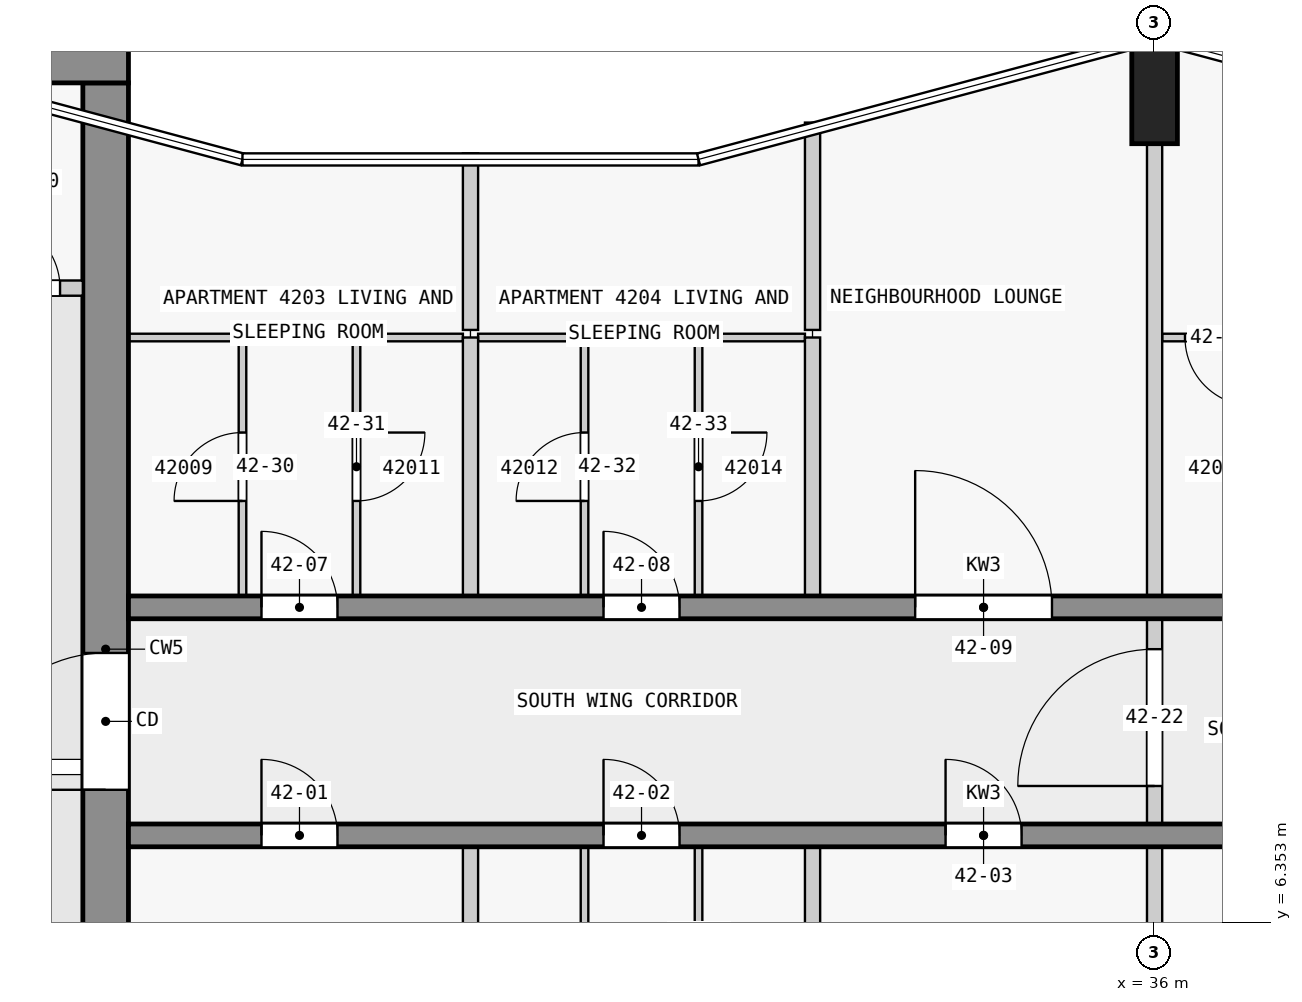
"""IFC4 building model, lengths in metres.
Left out: names, types, materials, properties, quantities, classifications, styles, units other than length and angle.
Written with IfcOpenShell. Run it as: python <this file> out.ifc"""

import sys

from ifc_helpers import new_model, si_unit, direction, frame, frame_2d, origin, origin_2d, place, context, subcontext, project, spatial, rectangle, extrude, element, fill, save


model = new_model("IFC4")
c1 = context("Model", 3, precision=1e-05, world=origin(), true_north=direction((0.0, 1.0)))
c2 = subcontext(c1, "Body", "Model", "MODEL_VIEW")
j1 = project(units=[si_unit("LENGTHUNIT", "METRE"), si_unit("PLANEANGLEUNIT", "RADIAN")], contexts=[c1])
p1 = place(None, origin())
s1 = spatial("IfcSite", under=j1, at=p1, CompositionType="ELEMENT")
p2 = place(p1, origin())
s2 = spatial("IfcBuilding", under=s1, at=p2, CompositionType="ELEMENT")
p3 = place(p2, frame((0.0, 0.0, 163.9)))
s3 = spatial("IfcBuildingStorey", under=s2, at=p3, CompositionType="ELEMENT", Elevation=163.9)
p4 = place(p3, frame((36.0, 17.3, 0.0), z_axis=(0.0, 0.0, 1.0), x_axis=(1.0, 0.0, 0.0)))
e1 = element("IfcColumn", 1, at=p4, inside=s3, PredefinedType="COLUMN", context=c2, shape_type="SweptSolid", body=[
    extrude(rectangle(XDim=0.6, YDim=1.4, at=origin_2d()), origin(), (0.0, 0.0, 1.0), 3.5),
])
p5 = place(p3, frame((1.38, 17.7, 0.0), z_axis=(0.0, 0.0, 1.0), x_axis=(1.0, 0.0, 0.0)))
e2 = element("IfcWall", 2, at=p5, inside=s3, PredefinedType="SHEAR", context=c2, shape_type="SweptSolid", body=[
    extrude(rectangle(XDim=21.12, YDim=0.6, at=frame_2d((10.56, 0.0))), origin(), (0.0, 0.0, 1.0), 3.25),
])
p6 = place(p5, frame((6.4, 0.0, 0.0)))
e3 = element("IfcOpeningElement", 3, at=p6, cuts=e2, PredefinedType="OPENING", context=c2, shape_type="SweptSolid", body=[
    extrude(rectangle(XDim=1.8, YDim=2.1, at=frame_2d((0.9, 1.05))), frame((0.0, 0.31, 0.0), z_axis=(0.0, -1.0, 0.0), x_axis=(1.0, 0.0, 0.0)), (0.0, 0.0, 1.0), 0.62),
])
p7 = place(p3, frame((22.2, 2.5, 0.0), z_axis=(0.0, 0.0, 1.0), x_axis=(0.0, 1.0, 0.0)))
e4 = element("IfcWall", 4, at=p7, inside=s3, PredefinedType="SHEAR", context=c2, shape_type="SweptSolid", body=[
    extrude(rectangle(XDim=14.9, YDim=0.6, at=frame_2d((7.45, 0.0))), origin(), (0.0, 0.0, 1.0), 3.25),
])
p8 = place(p7, frame((5.6, 0.0, 0.0)))
e5 = element("IfcOpeningElement", 5, at=p8, cuts=e4, PredefinedType="OPENING", context=c2, shape_type="SweptSolid", body=[
    extrude(rectangle(XDim=1.8, YDim=2.1, at=frame_2d((0.9, 1.05))), frame((0.0, 0.31, 0.0), z_axis=(0.0, -1.0, 0.0), x_axis=(1.0, 0.0, 0.0)), (0.0, 0.0, 1.0), 0.62),
])
p9 = place(p3, frame((22.5, 7.5, 0.0), z_axis=(0.0, 0.0, 1.0), x_axis=(1.0, 0.0, 0.0)))
e6 = element("IfcWall", 6, at=p9, inside=s3, PredefinedType="SHEAR", context=c2, shape_type="SweptSolid", body=[
    extrude(rectangle(XDim=22.5, YDim=0.3, at=frame_2d((11.25, 0.0))), origin(), (0.0, 0.0, 1.0), 3.25),
])
p10 = place(p9, frame((1.75, 0.0, 0.0)))
e7 = element("IfcOpeningElement", 7, at=p10, cuts=e6, PredefinedType="OPENING", context=c2, shape_type="SweptSolid", body=[
    extrude(rectangle(XDim=1.0, YDim=2.1, at=frame_2d((0.5, 1.05))), frame((0.0, 0.16, 0.0), z_axis=(0.0, -1.0, 0.0), x_axis=(1.0, 0.0, 0.0)), (0.0, 0.0, 1.0), 0.32),
])
p11 = place(p9, frame((6.25, 0.0, 0.0)))
e8 = element("IfcOpeningElement", 8, at=p11, cuts=e6, PredefinedType="OPENING", context=c2, shape_type="SweptSolid", body=[
    extrude(rectangle(XDim=1.0, YDim=2.1, at=frame_2d((0.5, 1.05))), frame((0.0, 0.16, 0.0), z_axis=(0.0, -1.0, 0.0), x_axis=(1.0, 0.0, 0.0)), (0.0, 0.0, 1.0), 0.32),
])
p12 = place(p9, frame((10.75, 0.0, 0.0)))
e9 = element("IfcOpeningElement", 9, at=p12, cuts=e6, PredefinedType="OPENING", context=c2, shape_type="SweptSolid", body=[
    extrude(rectangle(XDim=1.0, YDim=2.1, at=frame_2d((0.5, 1.05))), frame((0.0, 0.16, 0.0), z_axis=(0.0, -1.0, 0.0), x_axis=(1.0, 0.0, 0.0)), (0.0, 0.0, 1.0), 0.32),
])
p13 = place(p9, frame((15.25, 0.0, 0.0)))
e10 = element("IfcOpeningElement", 10, at=p13, cuts=e6, PredefinedType="OPENING", context=c2, shape_type="SweptSolid", body=[
    extrude(rectangle(XDim=1.0, YDim=2.1, at=frame_2d((0.5, 1.05))), frame((0.0, 0.16, 0.0), z_axis=(0.0, -1.0, 0.0), x_axis=(1.0, 0.0, 0.0)), (0.0, 0.0, 1.0), 0.32),
])
p14 = place(p9, frame((18.75, 0.0, 0.0)))
e11 = element("IfcOpeningElement", 11, at=p14, cuts=e6, PredefinedType="OPENING", context=c2, shape_type="SweptSolid", body=[
    extrude(rectangle(XDim=0.9, YDim=2.1, at=frame_2d((0.45, 1.05))), frame((0.0, 0.16, 0.0), z_axis=(0.0, -1.0, 0.0), x_axis=(1.0, 0.0, 0.0)), (0.0, 0.0, 1.0), 0.32),
])
p15 = place(p9, frame((20.95, 0.0, 0.0)))
e12 = element("IfcOpeningElement", 12, at=p15, cuts=e6, PredefinedType="OPENING", context=c2, shape_type="SweptSolid", body=[
    extrude(rectangle(XDim=1.0, YDim=2.1, at=frame_2d((0.5, 1.05))), frame((0.0, 0.16, 0.0), z_axis=(0.0, -1.0, 0.0), x_axis=(1.0, 0.0, 0.0)), (0.0, 0.0, 1.0), 0.32),
])
p16 = place(p3, frame((22.5, 10.5, 0.0), z_axis=(0.0, 0.0, 1.0), x_axis=(1.0, 0.0, 0.0)))
e13 = element("IfcWall", 13, at=p16, inside=s3, PredefinedType="SHEAR", context=c2, shape_type="SweptSolid", body=[
    extrude(rectangle(XDim=22.5, YDim=0.3, at=frame_2d((11.25, 0.0))), origin(), (0.0, 0.0, 1.0), 3.25),
])
p17 = place(p16, frame((1.75, 0.0, 0.0)))
e14 = element("IfcOpeningElement", 14, at=p17, cuts=e13, PredefinedType="OPENING", context=c2, shape_type="SweptSolid", body=[
    extrude(rectangle(XDim=1.0, YDim=2.1, at=frame_2d((0.5, 1.05))), frame((0.0, 0.16, 0.0), z_axis=(0.0, -1.0, 0.0), x_axis=(1.0, 0.0, 0.0)), (0.0, 0.0, 1.0), 0.32),
])
p18 = place(p16, frame((6.25, 0.0, 0.0)))
e15 = element("IfcOpeningElement", 15, at=p18, cuts=e13, PredefinedType="OPENING", context=c2, shape_type="SweptSolid", body=[
    extrude(rectangle(XDim=1.0, YDim=2.1, at=frame_2d((0.5, 1.05))), frame((0.0, 0.16, 0.0), z_axis=(0.0, -1.0, 0.0), x_axis=(1.0, 0.0, 0.0)), (0.0, 0.0, 1.0), 0.32),
])
p19 = place(p16, frame((10.35, 0.0, 0.0)))
e16 = element("IfcOpeningElement", 16, at=p19, cuts=e13, PredefinedType="OPENING", context=c2, shape_type="SweptSolid", body=[
    extrude(rectangle(XDim=1.8, YDim=2.1, at=frame_2d((0.9, 1.05))), frame((0.0, 0.16, 0.0), z_axis=(0.0, -1.0, 0.0), x_axis=(1.0, 0.0, 0.0)), (0.0, 0.0, 1.0), 0.32),
])
p20 = place(p16, frame((16.85, 0.0, 0.0)))
e17 = element("IfcOpeningElement", 17, at=p20, cuts=e13, PredefinedType="OPENING", context=c2, shape_type="SweptSolid", body=[
    extrude(rectangle(XDim=1.0, YDim=2.1, at=frame_2d((0.5, 1.05))), frame((0.0, 0.16, 0.0), z_axis=(0.0, -1.0, 0.0), x_axis=(1.0, 0.0, 0.0)), (0.0, 0.0, 1.0), 0.32),
])
p21 = place(p3, frame((18.6, 14.7, 0.0), z_axis=(0.0, 0.0, 1.0), x_axis=(1.0, 0.0, 0.0)))
e18 = element("IfcWall", 18, at=p21, inside=s3, PredefinedType="PARTITIONING", context=c2, shape_type="SweptSolid", body=[
    extrude(rectangle(XDim=3.3, YDim=0.2, at=frame_2d((1.65, 0.0))), origin(), (0.0, 0.0, 1.0), 3.25),
])
p22 = place(p21, frame((0.45, 0.0, 0.0)))
e19 = element("IfcOpeningElement", 19, at=p22, cuts=e18, PredefinedType="OPENING", context=c2, shape_type="SweptSolid", body=[
    extrude(rectangle(XDim=0.9, YDim=2.1, at=frame_2d((0.45, 1.05))), frame((0.0, 0.11, 0.0), z_axis=(0.0, -1.0, 0.0), x_axis=(1.0, 0.0, 0.0)), (0.0, 0.0, 1.0), 0.22),
])
p23 = place(p21, frame((2.1, 0.0, 0.0)))
e20 = element("IfcOpeningElement", 20, at=p23, cuts=e18, PredefinedType="OPENING", context=c2, shape_type="SweptSolid", body=[
    extrude(rectangle(XDim=0.9, YDim=2.1, at=frame_2d((0.45, 1.05))), frame((0.0, 0.11, 0.0), z_axis=(0.0, -1.0, 0.0), x_axis=(1.0, 0.0, 0.0)), (0.0, 0.0, 1.0), 0.22),
])
p24 = place(p3, frame((23.95, 14.05, 0.0), z_axis=(0.0, 0.0, 1.0), x_axis=(-1.0, 0.0, 0.0)))
e21 = element("IfcWall", 21, at=p24, inside=s3, PredefinedType="PARTITIONING", context=c2, shape_type="SweptSolid", body=[
    extrude(rectangle(XDim=1.45, YDim=0.1, at=frame_2d((0.725, 0.0))), origin(), (0.0, 0.0, 1.0), 3.25),
])
for number, where, z_axis, x_axis in (
    (22, (26.9, 14.05, 0.0), (0.0, 0.0, 1.0), (-1.0, 0.0, 0.0)),
    (23, (28.45, 14.05, 0.0), (0.0, 0.0, 1.0), (-1.0, 0.0, 0.0)),
    (24, (31.4, 14.05, 0.0), (0.0, 0.0, 1.0), (-1.0, 0.0, 0.0)),
):
    element("IfcWall", number, at=place(p3, frame(where, z_axis=z_axis, x_axis=x_axis)), inside=s3, PredefinedType="PARTITIONING", context=c2, shape_type="SweptSolid", body=[
        extrude(rectangle(XDim=1.35, YDim=0.1, at=frame_2d((0.675, 0.0))), origin(), (0.0, 0.0, 1.0), 3.25),
    ])
p25 = place(p3, frame((37.55, 14.05, 0.0), z_axis=(0.0, 0.0, 1.0), x_axis=(-1.0, 0.0, 0.0)))
e25 = element("IfcWall", 25, at=p25, inside=s3, PredefinedType="PARTITIONING", context=c2, shape_type="SweptSolid", body=[
    extrude(rectangle(XDim=1.45, YDim=0.1, at=frame_2d((0.725, 0.0))), origin(), (0.0, 0.0, 1.0), 3.25),
])
p26 = place(p25, frame((0.25, 0.0, 0.0)))
e26 = element("IfcOpeningElement", 26, at=p26, cuts=e25, PredefinedType="OPENING", context=c2, shape_type="SweptSolid", body=[
    extrude(rectangle(XDim=0.9, YDim=2.1, at=frame_2d((0.45, 1.05))), frame((0.0, 0.06, 0.0), z_axis=(0.0, -1.0, 0.0), x_axis=(1.0, 0.0, 0.0)), (0.0, 0.0, 1.0), 0.12),
])
p27 = place(p3, frame((24.0, 10.65, 0.0), z_axis=(0.0, 0.0, 1.0), x_axis=(0.0, 1.0, 0.0)))
e27 = element("IfcWall", 27, at=p27, inside=s3, PredefinedType="PARTITIONING", context=c2, shape_type="SweptSolid", body=[
    extrude(rectangle(XDim=3.4, YDim=0.1, at=frame_2d((1.7, 0.0))), origin(), (0.0, 0.0, 1.0), 3.25),
])
p28 = place(p27, frame((1.25, 0.0, 0.0)))
e28 = element("IfcOpeningElement", 28, at=p28, cuts=e27, PredefinedType="OPENING", context=c2, shape_type="SweptSolid", body=[
    extrude(rectangle(XDim=0.9, YDim=2.1, at=frame_2d((0.45, 1.05))), frame((0.0, 0.06, 0.0), z_axis=(0.0, -1.0, 0.0), x_axis=(1.0, 0.0, 0.0)), (0.0, 0.0, 1.0), 0.12),
])
p29 = place(p3, frame((25.5, 14.05, 0.0), z_axis=(0.0, 0.0, 1.0), x_axis=(0.0, -1.0, 0.0)))
e29 = element("IfcWall", 29, at=p29, inside=s3, PredefinedType="PARTITIONING", context=c2, shape_type="SweptSolid", body=[
    extrude(rectangle(XDim=3.4, YDim=0.1, at=frame_2d((1.7, 0.0))), origin(), (0.0, 0.0, 1.0), 3.25),
])
p30 = place(p29, frame((1.25, 0.0, 0.0)))
e30 = element("IfcOpeningElement", 30, at=p30, cuts=e29, PredefinedType="OPENING", context=c2, shape_type="SweptSolid", body=[
    extrude(rectangle(XDim=0.9, YDim=2.1, at=frame_2d((0.45, 1.05))), frame((0.0, 0.06, 0.0), z_axis=(0.0, -1.0, 0.0), x_axis=(1.0, 0.0, 0.0)), (0.0, 0.0, 1.0), 0.12),
])
p31 = place(p3, frame((27.0, 16.473, 0.0), z_axis=(0.0, 0.0, 1.0), x_axis=(0.0, -1.0, 0.0)))
e31 = element("IfcWall", 31, at=p31, inside=s3, PredefinedType="PARTITIONING", context=c2, shape_type="SweptSolid", body=[
    extrude(rectangle(XDim=2.323, YDim=0.2, at=frame_2d((1.162, 0.0))), origin(), (0.0, 0.0, 1.0), 3.25),
])
p32 = place(p3, frame((27.0, 1.527, 0.0), z_axis=(0.0, 0.0, 1.0), x_axis=(0.0, 1.0, 0.0)))
e32 = element("IfcWall", 32, at=p32, inside=s3, PredefinedType="PARTITIONING", context=c2, shape_type="SweptSolid", body=[
    extrude(rectangle(XDim=5.823, YDim=0.2, at=frame_2d((2.912, 0.0))), origin(), (0.0, 0.0, 1.0), 3.25),
])
p33 = place(p3, frame((27.0, 10.65, 0.0), z_axis=(0.0, 0.0, 1.0), x_axis=(0.0, 1.0, 0.0)))
e33 = element("IfcWall", 33, at=p33, inside=s3, PredefinedType="PARTITIONING", context=c2, shape_type="SweptSolid", body=[
    extrude(rectangle(XDim=3.4, YDim=0.2, at=frame_2d((1.7, 0.0))), origin(), (0.0, 0.0, 1.0), 3.25),
])
p34 = place(p3, frame((28.5, 3.95, 0.0), z_axis=(0.0, 0.0, 1.0), x_axis=(0.0, 1.0, 0.0)))
e34 = element("IfcWall", 34, at=p34, inside=s3, PredefinedType="PARTITIONING", context=c2, shape_type="SweptSolid", body=[
    extrude(rectangle(XDim=3.4, YDim=0.1, at=frame_2d((1.7, 0.0))), origin(), (0.0, 0.0, 1.0), 3.25),
])
p35 = place(p34, frame((1.25, 0.0, 0.0)))
e35 = element("IfcOpeningElement", 35, at=p35, cuts=e34, PredefinedType="OPENING", context=c2, shape_type="SweptSolid", body=[
    extrude(rectangle(XDim=0.9, YDim=2.1, at=frame_2d((0.45, 1.05))), frame((0.0, 0.06, 0.0), z_axis=(0.0, -1.0, 0.0), x_axis=(1.0, 0.0, 0.0)), (0.0, 0.0, 1.0), 0.12),
])
p36 = place(p3, frame((28.5, 10.65, 0.0), z_axis=(0.0, 0.0, 1.0), x_axis=(0.0, 1.0, 0.0)))
e36 = element("IfcWall", 36, at=p36, inside=s3, PredefinedType="PARTITIONING", context=c2, shape_type="SweptSolid", body=[
    extrude(rectangle(XDim=3.4, YDim=0.1, at=frame_2d((1.7, 0.0))), origin(), (0.0, 0.0, 1.0), 3.25),
])
p37 = place(p36, frame((1.25, 0.0, 0.0)))
e37 = element("IfcOpeningElement", 37, at=p37, cuts=e36, PredefinedType="OPENING", context=c2, shape_type="SweptSolid", body=[
    extrude(rectangle(XDim=0.9, YDim=2.1, at=frame_2d((0.45, 1.05))), frame((0.0, 0.06, 0.0), z_axis=(0.0, -1.0, 0.0), x_axis=(1.0, 0.0, 0.0)), (0.0, 0.0, 1.0), 0.12),
])
p38 = place(p3, frame((30.0, 7.35, 0.0), z_axis=(0.0, 0.0, 1.0), x_axis=(0.0, -1.0, 0.0)))
e38 = element("IfcWall", 38, at=p38, inside=s3, PredefinedType="PARTITIONING", context=c2, shape_type="SweptSolid", body=[
    extrude(rectangle(XDim=3.4, YDim=0.1, at=frame_2d((1.7, 0.0))), origin(), (0.0, 0.0, 1.0), 3.25),
])
p39 = place(p38, frame((1.25, 0.0, 0.0)))
e39 = element("IfcOpeningElement", 39, at=p39, cuts=e38, PredefinedType="OPENING", context=c2, shape_type="SweptSolid", body=[
    extrude(rectangle(XDim=0.9, YDim=2.1, at=frame_2d((0.45, 1.05))), frame((0.0, 0.06, 0.0), z_axis=(0.0, -1.0, 0.0), x_axis=(1.0, 0.0, 0.0)), (0.0, 0.0, 1.0), 0.12),
])
p40 = place(p3, frame((30.0, 14.05, 0.0), z_axis=(0.0, 0.0, 1.0), x_axis=(0.0, -1.0, 0.0)))
e40 = element("IfcWall", 40, at=p40, inside=s3, PredefinedType="PARTITIONING", context=c2, shape_type="SweptSolid", body=[
    extrude(rectangle(XDim=3.4, YDim=0.1, at=frame_2d((1.7, 0.0))), origin(), (0.0, 0.0, 1.0), 3.25),
])
p41 = place(p40, frame((1.25, 0.0, 0.0)))
e41 = element("IfcOpeningElement", 41, at=p41, cuts=e40, PredefinedType="OPENING", context=c2, shape_type="SweptSolid", body=[
    extrude(rectangle(XDim=0.9, YDim=2.1, at=frame_2d((0.45, 1.05))), frame((0.0, 0.06, 0.0), z_axis=(0.0, -1.0, 0.0), x_axis=(1.0, 0.0, 0.0)), (0.0, 0.0, 1.0), 0.12),
])
p42 = place(p3, frame((31.5, 16.878, 0.0), z_axis=(0.0, 0.0, 1.0), x_axis=(0.0, -1.0, 0.0)))
e42 = element("IfcWall", 42, at=p42, inside=s3, PredefinedType="PARTITIONING", context=c2, shape_type="SweptSolid", body=[
    extrude(rectangle(XDim=2.728, YDim=0.2, at=frame_2d((1.364, 0.0))), origin(), (0.0, 0.0, 1.0), 3.25),
])
for number, where, z_axis, x_axis in (
    (43, (31.5, 3.95, 0.0), (0.0, 0.0, 1.0), (0.0, 1.0, 0.0)),
    (44, (31.5, 10.65, 0.0), (0.0, 0.0, 1.0), (0.0, 1.0, 0.0)),
):
    element("IfcWall", number, at=place(p3, frame(where, z_axis=z_axis, x_axis=x_axis)), inside=s3, PredefinedType="PARTITIONING", context=c2, shape_type="SweptSolid", body=[
        extrude(rectangle(XDim=3.4, YDim=0.2, at=frame_2d((1.7, 0.0))), origin(), (0.0, 0.0, 1.0), 3.25),
    ])
for number, where, z_axis, x_axis in (
    (45, (36.0, 1.4, 0.0), (0.0, 0.0, 1.0), (0.0, 1.0, 0.0)),
    (46, (36.0, 10.65, 0.0), (0.0, 0.0, 1.0), (0.0, 1.0, 0.0)),
):
    element("IfcWall", number, at=place(p3, frame(where, z_axis=z_axis, x_axis=x_axis)), inside=s3, PredefinedType="PARTITIONING", context=c2, shape_type="SweptSolid", body=[
        extrude(rectangle(XDim=5.95, YDim=0.2, at=frame_2d((2.975, 0.0))), origin(), (0.0, 0.0, 1.0), 3.25),
    ])
p43 = place(p3, frame((36.0, 7.45, 0.0), z_axis=(0.0, 0.0, 1.0), x_axis=(0.0, 1.0, 0.0)))
e47 = element("IfcWall", 47, at=p43, inside=s3, PredefinedType="PARTITIONING", context=c2, shape_type="SweptSolid", body=[
    extrude(rectangle(XDim=3.1, YDim=0.2, at=frame_2d((1.55, 0.0))), origin(), (0.0, 0.0, 1.0), 3.25),
])
p44 = place(p43, frame((0.7, 0.0, 0.0)))
e48 = element("IfcOpeningElement", 48, at=p44, cuts=e47, PredefinedType="OPENING", context=c2, shape_type="SweptSolid", body=[
    extrude(rectangle(XDim=1.8, YDim=2.1, at=frame_2d((0.9, 1.05))), frame((0.0, 0.11, 0.0), z_axis=(0.0, -1.0, 0.0), x_axis=(1.0, 0.0, 0.0)), (0.0, 0.0, 1.0), 0.22),
])
p45 = place(p8, origin())
e49 = element("IfcDoor", 49, at=p45, inside=s3, OperationType="DOUBLE_DOOR_SINGLE_SWING", PredefinedType="DOOR", context=c2, shape_type="SweptSolid", body=[
    extrude(rectangle(XDim=1.8, YDim=2.1, at=frame_2d((0.9, 1.05))), frame((0.0, 0.025, 0.0), z_axis=(0.0, -1.0, 0.0), x_axis=(1.0, 0.0, 0.0)), (0.0, 0.0, 1.0), 0.05),
])
fill(e5, e49)
p46 = place(p23, origin())
e50 = element("IfcDoor", 50, at=p46, inside=s3, OperationType="SINGLE_SWING_LEFT", PredefinedType="DOOR", context=c2, shape_type="SweptSolid", body=[
    extrude(rectangle(XDim=0.9, YDim=2.1, at=frame_2d((0.45, 1.05))), frame((0.0, 0.025, 0.0), z_axis=(0.0, -1.0, 0.0), x_axis=(1.0, 0.0, 0.0)), (0.0, 0.0, 1.0), 0.05),
])
fill(e20, e50)
p47 = place(p10, origin())
e51 = element("IfcDoor", 51, at=p47, inside=s3, OperationType="SINGLE_SWING_LEFT", PredefinedType="DOOR", context=c2, shape_type="SweptSolid", body=[
    extrude(rectangle(XDim=1.0, YDim=2.1, at=frame_2d((0.5, 1.05))), frame((0.0, 0.025, 0.0), z_axis=(0.0, -1.0, 0.0), x_axis=(1.0, 0.0, 0.0)), (0.0, 0.0, 1.0), 0.05),
])
fill(e7, e51)
p48 = place(p11, origin())
e52 = element("IfcDoor", 52, at=p48, inside=s3, OperationType="SINGLE_SWING_LEFT", PredefinedType="DOOR", context=c2, shape_type="SweptSolid", body=[
    extrude(rectangle(XDim=1.0, YDim=2.1, at=frame_2d((0.5, 1.05))), frame((0.0, 0.025, 0.0), z_axis=(0.0, -1.0, 0.0), x_axis=(1.0, 0.0, 0.0)), (0.0, 0.0, 1.0), 0.05),
])
fill(e8, e52)
p49 = place(p12, origin())
e53 = element("IfcDoor", 53, at=p49, inside=s3, OperationType="SINGLE_SWING_LEFT", PredefinedType="DOOR", context=c2, shape_type="SweptSolid", body=[
    extrude(rectangle(XDim=1.0, YDim=2.1, at=frame_2d((0.5, 1.05))), frame((0.0, 0.025, 0.0), z_axis=(0.0, -1.0, 0.0), x_axis=(1.0, 0.0, 0.0)), (0.0, 0.0, 1.0), 0.05),
])
fill(e9, e53)
p50 = place(p17, origin())
e54 = element("IfcDoor", 54, at=p50, inside=s3, OperationType="SINGLE_SWING_LEFT", PredefinedType="DOOR", context=c2, shape_type="SweptSolid", body=[
    extrude(rectangle(XDim=1.0, YDim=2.1, at=frame_2d((0.5, 1.05))), frame((0.0, 0.025, 0.0), z_axis=(0.0, -1.0, 0.0), x_axis=(1.0, 0.0, 0.0)), (0.0, 0.0, 1.0), 0.05),
])
fill(e14, e54)
p51 = place(p18, origin())
e55 = element("IfcDoor", 55, at=p51, inside=s3, OperationType="SINGLE_SWING_LEFT", PredefinedType="DOOR", context=c2, shape_type="SweptSolid", body=[
    extrude(rectangle(XDim=1.0, YDim=2.1, at=frame_2d((0.5, 1.05))), frame((0.0, 0.025, 0.0), z_axis=(0.0, -1.0, 0.0), x_axis=(1.0, 0.0, 0.0)), (0.0, 0.0, 1.0), 0.05),
])
fill(e15, e55)
p52 = place(p19, origin())
e56 = element("IfcDoor", 56, at=p52, inside=s3, OperationType="SINGLE_SWING_LEFT", PredefinedType="DOOR", context=c2, shape_type="SweptSolid", body=[
    extrude(rectangle(XDim=1.8, YDim=2.1, at=frame_2d((0.9, 1.05))), frame((0.0, 0.025, 0.0), z_axis=(0.0, -1.0, 0.0), x_axis=(1.0, 0.0, 0.0)), (0.0, 0.0, 1.0), 0.05),
])
fill(e16, e56)
p53 = place(p44, origin())
e57 = element("IfcDoor", 57, at=p53, inside=s3, OperationType="SINGLE_SWING_RIGHT", PredefinedType="DOOR", context=c2, shape_type="SweptSolid", body=[
    extrude(rectangle(XDim=1.8, YDim=2.1, at=frame_2d((0.9, 1.05))), frame((0.0, 0.025, 0.0), z_axis=(0.0, -1.0, 0.0), x_axis=(1.0, 0.0, 0.0)), (0.0, 0.0, 1.0), 0.05),
])
fill(e48, e57)
p54 = place(p28, origin())
e58 = element("IfcDoor", 58, at=p54, inside=s3, OperationType="SINGLE_SWING_LEFT", PredefinedType="DOOR", context=c2, shape_type="SweptSolid", body=[
    extrude(rectangle(XDim=0.9, YDim=2.1, at=frame_2d((0.45, 1.05))), frame((0.0, 0.025, 0.0), z_axis=(0.0, -1.0, 0.0), x_axis=(1.0, 0.0, 0.0)), (0.0, 0.0, 1.0), 0.05),
])
fill(e28, e58)
p55 = place(p30, origin())
e59 = element("IfcDoor", 59, at=p55, inside=s3, OperationType="SINGLE_SWING_LEFT", PredefinedType="DOOR", context=c2, shape_type="SweptSolid", body=[
    extrude(rectangle(XDim=0.9, YDim=2.1, at=frame_2d((0.45, 1.05))), frame((0.0, 0.025, 0.0), z_axis=(0.0, -1.0, 0.0), x_axis=(1.0, 0.0, 0.0)), (0.0, 0.0, 1.0), 0.05),
])
fill(e30, e59)
p56 = place(p37, origin())
e60 = element("IfcDoor", 60, at=p56, inside=s3, OperationType="SINGLE_SWING_LEFT", PredefinedType="DOOR", context=c2, shape_type="SweptSolid", body=[
    extrude(rectangle(XDim=0.9, YDim=2.1, at=frame_2d((0.45, 1.05))), frame((0.0, 0.025, 0.0), z_axis=(0.0, -1.0, 0.0), x_axis=(1.0, 0.0, 0.0)), (0.0, 0.0, 1.0), 0.05),
])
fill(e37, e60)
p57 = place(p41, origin())
e61 = element("IfcDoor", 61, at=p57, inside=s3, OperationType="SINGLE_SWING_LEFT", PredefinedType="DOOR", context=c2, shape_type="SweptSolid", body=[
    extrude(rectangle(XDim=0.9, YDim=2.1, at=frame_2d((0.45, 1.05))), frame((0.0, 0.025, 0.0), z_axis=(0.0, -1.0, 0.0), x_axis=(1.0, 0.0, 0.0)), (0.0, 0.0, 1.0), 0.05),
])
fill(e41, e61)
p58 = place(p26, origin())
e62 = element("IfcDoor", 62, at=p58, inside=s3, OperationType="SINGLE_SWING_LEFT", PredefinedType="DOOR", context=c2, shape_type="SweptSolid", body=[
    extrude(rectangle(XDim=0.9, YDim=2.1, at=frame_2d((0.45, 1.05))), frame((0.0, 0.025, 0.0), z_axis=(0.0, -1.0, 0.0), x_axis=(1.0, 0.0, 0.0)), (0.0, 0.0, 1.0), 0.05),
])
fill(e26, e62)
save(model, sys.argv[1])
